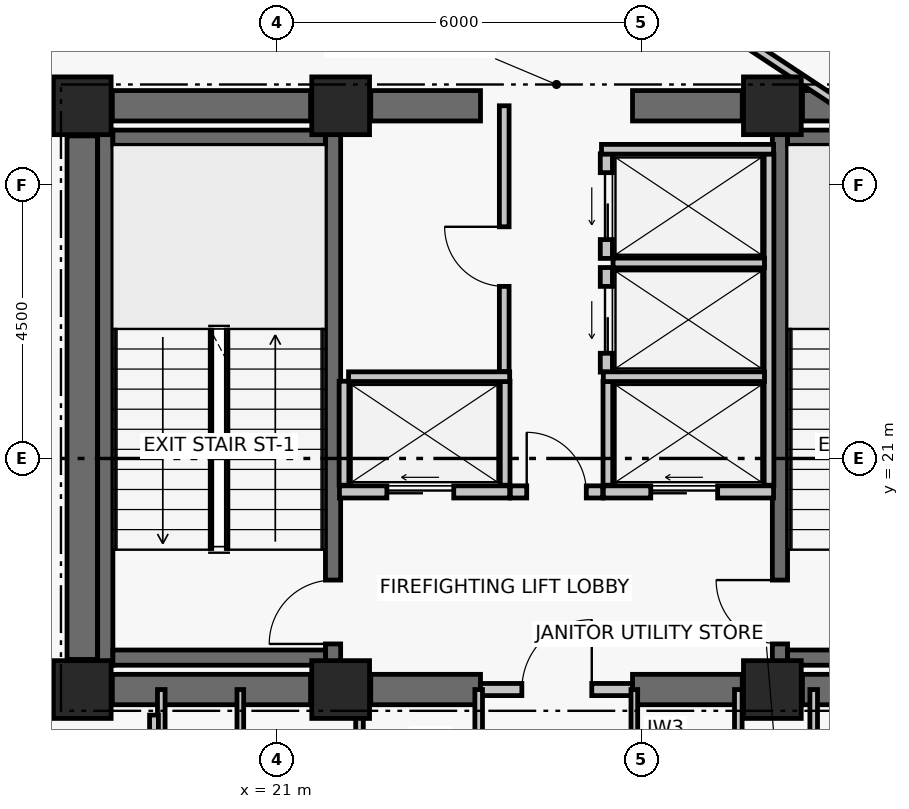
"""IFC4 building model, lengths in metres.
Left out: names, types, materials, properties, quantities, classifications, styles, units other than length and angle.
Written with IfcOpenShell. Run it as: python <this file> out.ifc"""

import sys

from ifc_helpers import new_model, si_unit, direction, frame, frame_2d, origin, origin_2d, place, context, subcontext, project, spatial, rectangle, extrude, element, fill, save


model = new_model("IFC4")
c1 = context("Model", 3, precision=1e-05, world=origin(), true_north=direction((0.0, 1.0)))
c2 = subcontext(c1, "Body", "Model", "MODEL_VIEW")
j1 = project(units=[si_unit("LENGTHUNIT", "METRE"), si_unit("PLANEANGLEUNIT", "RADIAN")], contexts=[c1])
p1 = place(None, origin())
s1 = spatial("IfcSite", under=j1, at=p1, CompositionType="ELEMENT")
p2 = place(p1, origin())
s2 = spatial("IfcBuilding", under=s1, at=p2, CompositionType="ELEMENT")
p3 = place(p2, frame((0.0, 0.0, 195.24)))
s3 = spatial("IfcBuildingStorey", under=s2, at=p3, CompositionType="ELEMENT", Elevation=195.24)
for number, where, z_axis, x_axis in (
    (1, (17.8, 17.2, 0.0), (0.0, 0.0, 1.0), (1.0, 0.0, 0.0)),
    (2, (22.05, 17.2, 0.0), (0.0, 0.0, 1.0), (1.0, 0.0, 0.0)),
    (3, (29.15, 17.2, 0.0), (0.0, 0.0, 1.0), (1.0, 0.0, 0.0)),
    (4, (17.8, 26.8, 0.0), (0.0, 0.0, 1.0), (1.0, 0.0, 0.0)),
    (5, (22.05, 26.8, 0.0), (0.0, 0.0, 1.0), (1.0, 0.0, 0.0)),
    (6, (29.15, 26.8, 0.0), (0.0, 0.0, 1.0), (1.0, 0.0, 0.0)),
):
    element("IfcColumn", number, at=place(p3, frame(where, z_axis=z_axis, x_axis=x_axis)), inside=s3, PredefinedType="COLUMN", context=c2, shape_type="SweptSolid", body=[
        extrude(rectangle(XDim=0.95, YDim=0.95, at=origin_2d()), origin(), (0.0, 0.0, 1.0), 3.72),
    ])
p4 = place(p3, frame((18.295, 17.2, 0.0), z_axis=(0.0, 0.0, 1.0), x_axis=(1.0, 0.0, 0.0)))
e7 = element("IfcWall", 7, at=p4, inside=s3, PredefinedType="SHEAR", context=c2, shape_type="SweptSolid", body=[
    extrude(rectangle(XDim=3.26, YDim=0.5, at=frame_2d((1.63, 0.0))), origin(), (0.0, 0.0, 1.0), 3.5),
])
p5 = place(p3, frame((22.545, 17.2, 0.0), z_axis=(0.0, 0.0, 1.0), x_axis=(1.0, 0.0, 0.0)))
e8 = element("IfcWall", 8, at=p5, inside=s3, PredefinedType="SHEAR", context=c2, shape_type="SweptSolid", body=[
    extrude(rectangle(XDim=1.805, YDim=0.5, at=frame_2d((0.903, 0.0))), origin(), (0.0, 0.0, 1.0), 3.5),
])
p6 = place(p3, frame((26.85, 17.2, 0.0), z_axis=(0.0, 0.0, 1.0), x_axis=(1.0, 0.0, 0.0)))
e9 = element("IfcWall", 9, at=p6, inside=s3, PredefinedType="SHEAR", context=c2, shape_type="SweptSolid", body=[
    extrude(rectangle(XDim=1.805, YDim=0.5, at=frame_2d((0.902, 0.0))), origin(), (0.0, 0.0, 1.0), 3.5),
])
for number, where, z_axis, x_axis in (
    (10, (29.645, 17.2, 0.0), (0.0, 0.0, 1.0), (1.0, 0.0, 0.0)),
    (11, (18.295, 26.8, 0.0), (0.0, 0.0, 1.0), (1.0, 0.0, 0.0)),
):
    element("IfcWall", number, at=place(p3, frame(where, z_axis=z_axis, x_axis=x_axis)), inside=s3, PredefinedType="SHEAR", context=c2, shape_type="SweptSolid", body=[
        extrude(rectangle(XDim=3.26, YDim=0.5, at=frame_2d((1.63, 0.0))), origin(), (0.0, 0.0, 1.0), 3.5),
    ])
p7 = place(p3, frame((22.545, 26.8, 0.0), z_axis=(0.0, 0.0, 1.0), x_axis=(1.0, 0.0, 0.0)))
e12 = element("IfcWall", 12, at=p7, inside=s3, PredefinedType="SHEAR", context=c2, shape_type="SweptSolid", body=[
    extrude(rectangle(XDim=1.805, YDim=0.5, at=frame_2d((0.903, 0.0))), origin(), (0.0, 0.0, 1.0), 3.5),
])
p8 = place(p3, frame((26.85, 26.8, 0.0), z_axis=(0.0, 0.0, 1.0), x_axis=(1.0, 0.0, 0.0)))
e13 = element("IfcWall", 13, at=p8, inside=s3, PredefinedType="SHEAR", context=c2, shape_type="SweptSolid", body=[
    extrude(rectangle(XDim=1.805, YDim=0.5, at=frame_2d((0.902, 0.0))), origin(), (0.0, 0.0, 1.0), 3.5),
])
p9 = place(p3, frame((29.645, 26.8, 0.0), z_axis=(0.0, 0.0, 1.0), x_axis=(1.0, 0.0, 0.0)))
e14 = element("IfcWall", 14, at=p9, inside=s3, PredefinedType="SHEAR", context=c2, shape_type="SweptSolid", body=[
    extrude(rectangle(XDim=3.26, YDim=0.5, at=frame_2d((1.63, 0.0))), origin(), (0.0, 0.0, 1.0), 3.5),
])
p10 = place(p3, frame((17.8, 17.695, 0.0), z_axis=(0.0, 0.0, 1.0), x_axis=(0.0, 1.0, 0.0)))
e15 = element("IfcWall", 15, at=p10, inside=s3, PredefinedType="SHEAR", context=c2, shape_type="SweptSolid", body=[
    extrude(rectangle(XDim=8.61, YDim=0.5, at=frame_2d((4.305, 0.0))), origin(), (0.0, 0.0, 1.0), 3.5),
])
p11 = place(p3, frame((18.179, 17.6, 0.0), z_axis=(0.0, 0.0, 1.0), x_axis=(0.0, 1.0, 0.0)))
e16 = element("IfcWall", 16, at=p11, inside=s3, PredefinedType="SHEAR", context=c2, shape_type="SweptSolid", body=[
    extrude(rectangle(XDim=8.8, YDim=0.25, at=frame_2d((4.4, 0.0))), origin(), (0.0, 0.0, 1.0), 3.5),
])
p12 = place(p3, frame((21.925, 17.6, 0.0), z_axis=(0.0, 0.0, 1.0), x_axis=(0.0, 1.0, 0.0)))
e17 = element("IfcWall", 17, at=p12, inside=s3, PredefinedType="SHEAR", context=c2, shape_type="SweptSolid", body=[
    extrude(rectangle(XDim=8.8, YDim=0.25, at=frame_2d((4.4, 0.0))), origin(), (0.0, 0.0, 1.0), 3.5),
])
p13 = place(p12, frame((0.35, 0.0, 0.0)))
e18 = element("IfcOpeningElement", 18, at=p13, cuts=e17, PredefinedType="OPENING", context=c2, shape_type="SweptSolid", body=[
    extrude(rectangle(XDim=1.05, YDim=2.08, at=frame_2d((0.525, 1.04))), frame((0.0, 0.135, 0.0), z_axis=(0.0, -1.0, 0.0), x_axis=(1.0, 0.0, 0.0)), (0.0, 0.0, 1.0), 0.27),
])
for number, where, z_axis, x_axis in (
    (19, (18.304, 17.725, 0.0), (0.0, 0.0, 1.0), (1.0, 0.0, 0.0)),
    (20, (18.304, 26.275, 0.0), (0.0, 0.0, 1.0), (1.0, 0.0, 0.0)),
):
    element("IfcWall", number, at=place(p3, frame(where, z_axis=z_axis, x_axis=x_axis)), inside=s3, PredefinedType="SHEAR", context=c2, shape_type="SweptSolid", body=[
        extrude(rectangle(XDim=3.496, YDim=0.25, at=frame_2d((1.748, 0.0))), origin(), (0.0, 0.0, 1.0), 3.5),
    ])
p14 = place(p3, frame((29.275, 17.6, 0.0), z_axis=(0.0, 0.0, 1.0), x_axis=(0.0, 1.0, 0.0)))
e21 = element("IfcWall", 21, at=p14, inside=s3, PredefinedType="SHEAR", context=c2, shape_type="SweptSolid", body=[
    extrude(rectangle(XDim=8.8, YDim=0.25, at=frame_2d((4.4, 0.0))), origin(), (0.0, 0.0, 1.0), 3.5),
])
p15 = place(p14, frame((0.35, 0.0, 0.0)))
e22 = element("IfcOpeningElement", 22, at=p15, cuts=e21, PredefinedType="OPENING", context=c2, shape_type="SweptSolid", body=[
    extrude(rectangle(XDim=1.05, YDim=2.08, at=frame_2d((0.525, 1.04))), frame((0.0, 0.135, 0.0), z_axis=(0.0, -1.0, 0.0), x_axis=(1.0, 0.0, 0.0)), (0.0, 0.0, 1.0), 0.27),
])
for number, where, z_axis, x_axis in (
    (23, (29.4, 17.725, 0.0), (0.0, 0.0, 1.0), (1.0, 0.0, 0.0)),
    (24, (29.4, 26.275, 0.0), (0.0, 0.0, 1.0), (1.0, 0.0, 0.0)),
):
    element("IfcWall", number, at=place(p3, frame(where, z_axis=z_axis, x_axis=x_axis)), inside=s3, PredefinedType="SHEAR", context=c2, shape_type="SweptSolid", body=[
        extrude(rectangle(XDim=3.496, YDim=0.25, at=frame_2d((1.748, 0.0))), origin(), (0.0, 0.0, 1.0), 3.5),
    ])
p16 = place(p3, frame((29.351, 29.666, 0.0), z_axis=(0.0, 0.0, 1.0), x_axis=(0.834275733291, -0.551347441131, 0.0)))
e25 = element("IfcWall", 25, at=p16, inside=s3, PredefinedType="PARTITIONING", context=c2, shape_type="SweptSolid", body=[
    extrude(rectangle(XDim=4.341, YDim=0.26, at=frame_2d((2.171, 0.0))), origin(), (0.0, 0.0, 1.0), 2.63),
])
p17 = place(p3, frame((24.35, 17.2, 0.0), z_axis=(0.0, 0.0, 1.0), x_axis=(1.0, 0.0, 0.0)))
e26 = element("IfcWall", 26, at=p17, inside=s3, PredefinedType="PARTITIONING", context=c2, shape_type="SweptSolid", body=[
    extrude(rectangle(XDim=2.5, YDim=0.2, at=frame_2d((1.25, 0.0))), origin(), (0.0, 0.0, 1.0), 2.63),
])
p18 = place(p17, frame((0.68, 0.0, 0.0)))
e27 = element("IfcOpeningElement", 27, at=p18, cuts=e26, PredefinedType="OPENING", context=c2, shape_type="SweptSolid", body=[
    extrude(rectangle(XDim=1.15, YDim=2.08, at=frame_2d((0.575, 1.04))), frame((0.0, 0.11, 0.0), z_axis=(0.0, -1.0, 0.0), x_axis=(1.0, 0.0, 0.0)), (0.0, 0.0, 1.0), 0.22),
])
p19 = place(p3, frame((24.84, 20.45, 0.0), z_axis=(0.0, 0.0, 1.0), x_axis=(1.0, 0.0, 0.0)))
e28 = element("IfcWall", 28, at=p19, inside=s3, PredefinedType="PARTITIONING", context=c2, shape_type="SweptSolid", body=[
    extrude(rectangle(XDim=1.52, YDim=0.2, at=frame_2d((0.76, 0.0))), origin(), (0.0, 0.0, 1.0), 3.5),
])
p20 = place(p19, frame((0.27, 0.0, 0.0)))
e29 = element("IfcOpeningElement", 29, at=p20, cuts=e28, PredefinedType="OPENING", context=c2, shape_type="SweptSolid", body=[
    extrude(rectangle(XDim=0.98, YDim=2.06, at=frame_2d((0.49, 1.03))), frame((0.0, 0.11, 0.0), z_axis=(0.0, -1.0, 0.0), x_axis=(1.0, 0.0, 0.0)), (0.0, 0.0, 1.0), 0.22),
])
p21 = place(p3, frame((22.03, 20.45, 0.0), z_axis=(0.0, 0.0, 1.0), x_axis=(1.0, 0.0, 0.0)))
e30 = element("IfcWall", 30, at=p21, inside=s3, PredefinedType="PARTITIONING", context=c2, shape_type="SweptSolid", body=[
    extrude(rectangle(XDim=2.8, YDim=0.2, at=frame_2d((1.4, 0.0))), origin(), (0.0, 0.0, 1.0), 3.5),
])
p22 = place(p21, frame((0.78, 0.0, 0.0)))
e31 = element("IfcOpeningElement", 31, at=p22, cuts=e30, PredefinedType="OPENING", context=c2, shape_type="SweptSolid", body=[
    extrude(rectangle(XDim=1.1, YDim=2.08, at=frame_2d((0.55, 1.04))), frame((0.0, 0.11, 0.0), z_axis=(0.0, -1.0, 0.0), x_axis=(1.0, 0.0, 0.0)), (0.0, 0.0, 1.0), 0.22),
])
p23 = place(p3, frame((26.37, 20.45, 0.0), z_axis=(0.0, 0.0, 1.0), x_axis=(1.0, 0.0, 0.0)))
e32 = element("IfcWall", 32, at=p23, inside=s3, PredefinedType="PARTITIONING", context=c2, shape_type="SweptSolid", body=[
    extrude(rectangle(XDim=2.8, YDim=0.2, at=frame_2d((1.4, 0.0))), origin(), (0.0, 0.0, 1.0), 3.5),
])
p24 = place(p23, frame((0.78, 0.0, 0.0)))
e33 = element("IfcOpeningElement", 33, at=p24, cuts=e32, PredefinedType="OPENING", context=c2, shape_type="SweptSolid", body=[
    extrude(rectangle(XDim=1.1, YDim=2.08, at=frame_2d((0.55, 1.04))), frame((0.0, 0.11, 0.0), z_axis=(0.0, -1.0, 0.0), x_axis=(1.0, 0.0, 0.0)), (0.0, 0.0, 1.0), 0.22),
])
p25 = place(p3, frame((26.42, 22.42, 0.0), z_axis=(0.0, 0.0, 1.0), x_axis=(0.0, 1.0, 0.0)))
e34 = element("IfcWall", 34, at=p25, inside=s3, PredefinedType="PARTITIONING", context=c2, shape_type="SweptSolid", body=[
    extrude(rectangle(XDim=1.72, YDim=0.2, at=frame_2d((0.86, 0.0))), origin(), (0.0, 0.0, 1.0), 3.5),
])
p26 = place(p25, frame((0.31, 0.0, 0.0)))
e35 = element("IfcOpeningElement", 35, at=p26, cuts=e34, PredefinedType="OPENING", context=c2, shape_type="SweptSolid", body=[
    extrude(rectangle(XDim=1.1, YDim=2.08, at=frame_2d((0.55, 1.04))), frame((0.0, 0.11, 0.0), z_axis=(0.0, -1.0, 0.0), x_axis=(1.0, 0.0, 0.0)), (0.0, 0.0, 1.0), 0.22),
])
p27 = place(p3, frame((26.42, 24.29, 0.0), z_axis=(0.0, 0.0, 1.0), x_axis=(0.0, 1.0, 0.0)))
e36 = element("IfcWall", 36, at=p27, inside=s3, PredefinedType="PARTITIONING", context=c2, shape_type="SweptSolid", body=[
    extrude(rectangle(XDim=1.72, YDim=0.2, at=frame_2d((0.86, 0.0))), origin(), (0.0, 0.0, 1.0), 3.5),
])
p28 = place(p27, frame((0.31, 0.0, 0.0)))
e37 = element("IfcOpeningElement", 37, at=p28, cuts=e36, PredefinedType="OPENING", context=c2, shape_type="SweptSolid", body=[
    extrude(rectangle(XDim=1.1, YDim=2.08, at=frame_2d((0.55, 1.04))), frame((0.0, 0.11, 0.0), z_axis=(0.0, -1.0, 0.0), x_axis=(1.0, 0.0, 0.0)), (0.0, 0.0, 1.0), 0.22),
])
for number, where, z_axis, x_axis in (
    (38, (22.105, 20.56, 0.0), (0.0, 0.0, 1.0), (0.0, 1.0, 0.0)),
    (39, (24.755, 20.56, 0.0), (0.0, 0.0, 1.0), (0.0, 1.0, 0.0)),
):
    element("IfcWall", number, at=place(p3, frame(where, z_axis=z_axis, x_axis=x_axis)), inside=s3, PredefinedType="PARTITIONING", context=c2, shape_type="SweptSolid", body=[
        extrude(rectangle(XDim=1.71, YDim=0.16, at=frame_2d((0.855, 0.0))), origin(), (0.0, 0.0, 1.0), 3.5),
    ])
p29 = place(p3, frame((22.18, 22.345, 0.0), z_axis=(0.0, 0.0, 1.0), x_axis=(1.0, 0.0, 0.0)))
e40 = element("IfcWall", 40, at=p29, inside=s3, PredefinedType="PARTITIONING", context=c2, shape_type="SweptSolid", body=[
    extrude(rectangle(XDim=2.65, YDim=0.16, at=frame_2d((1.325, 0.0))), origin(), (0.0, 0.0, 1.0), 3.5),
])
p30 = place(p3, frame((29.095, 20.56, 0.0), z_axis=(0.0, 0.0, 1.0), x_axis=(0.0, 1.0, 0.0)))
e41 = element("IfcWall", 41, at=p30, inside=s3, PredefinedType="PARTITIONING", context=c2, shape_type="SweptSolid", body=[
    extrude(rectangle(XDim=5.45, YDim=0.16, at=frame_2d((2.725, 0.0))), origin(), (0.0, 0.0, 1.0), 3.5),
])
p31 = place(p3, frame((26.445, 20.56, 0.0), z_axis=(0.0, 0.0, 1.0), x_axis=(0.0, 1.0, 0.0)))
e42 = element("IfcWall", 42, at=p31, inside=s3, PredefinedType="PARTITIONING", context=c2, shape_type="SweptSolid", body=[
    extrude(rectangle(XDim=1.71, YDim=0.16, at=frame_2d((0.855, 0.0))), origin(), (0.0, 0.0, 1.0), 3.5),
])
p32 = place(p3, frame((26.37, 22.345, 0.0), z_axis=(0.0, 0.0, 1.0), x_axis=(1.0, 0.0, 0.0)))
e43 = element("IfcWall", 43, at=p32, inside=s3, PredefinedType="PARTITIONING", context=c2, shape_type="SweptSolid", body=[
    extrude(rectangle(XDim=2.65, YDim=0.16, at=frame_2d((1.325, 0.0))), origin(), (0.0, 0.0, 1.0), 3.5),
])
p33 = place(p3, frame((26.53, 24.215, 0.0), z_axis=(0.0, 0.0, 1.0), x_axis=(1.0, 0.0, 0.0)))
e44 = element("IfcWall", 44, at=p33, inside=s3, PredefinedType="PARTITIONING", context=c2, shape_type="SweptSolid", body=[
    extrude(rectangle(XDim=2.49, YDim=0.16, at=frame_2d((1.245, 0.0))), origin(), (0.0, 0.0, 1.0), 3.5),
])
p34 = place(p3, frame((26.34, 26.085, 0.0), z_axis=(0.0, 0.0, 1.0), x_axis=(1.0, 0.0, 0.0)))
e45 = element("IfcWall", 45, at=p34, inside=s3, PredefinedType="PARTITIONING", context=c2, shape_type="SweptSolid", body=[
    extrude(rectangle(XDim=2.83, YDim=0.16, at=frame_2d((1.415, 0.0))), origin(), (0.0, 0.0, 1.0), 3.5),
])
p35 = place(p3, frame((24.74, 22.43, 0.0), z_axis=(0.0, 0.0, 1.0), x_axis=(0.0, 1.0, 0.0)))
e46 = element("IfcWall", 46, at=p35, inside=s3, PredefinedType="PARTITIONING", context=c2, shape_type="SweptSolid", body=[
    extrude(rectangle(XDim=4.37, YDim=0.16, at=frame_2d((2.185, 0.0))), origin(), (0.0, 0.0, 1.0), 2.63),
])
p36 = place(p35, frame((1.4, 0.0, 0.0)))
e47 = element("IfcOpeningElement", 47, at=p36, cuts=e46, PredefinedType="OPENING", context=c2, shape_type="SweptSolid", body=[
    extrude(rectangle(XDim=0.98, YDim=2.06, at=frame_2d((0.49, 1.03))), frame((0.0, 0.09, 0.0), z_axis=(0.0, -1.0, 0.0), x_axis=(1.0, 0.0, 0.0)), (0.0, 0.0, 1.0), 0.18),
])
p37 = place(p3, frame((19.1, 14.95, 0.0), z_axis=(0.0, 0.0, 1.0), x_axis=(0.0, 1.0, 0.0)))
e48 = element("IfcWall", 48, at=p37, inside=s3, PredefinedType="PARTITIONING", context=c2, shape_type="SweptSolid", body=[
    extrude(rectangle(XDim=2.25, YDim=0.125, at=frame_2d((1.125, 0.0))), origin(), (0.0, 0.0, 1.0), 2.63),
])
p38 = place(p3, frame((20.4, 14.95, 0.0), z_axis=(0.0, 0.0, 1.0), x_axis=(0.0, 1.0, 0.0)))
e49 = element("IfcWall", 49, at=p38, inside=s3, PredefinedType="PARTITIONING", context=c2, shape_type="SweptSolid", body=[
    extrude(rectangle(XDim=2.25, YDim=0.11, at=frame_2d((1.125, 0.0))), origin(), (0.0, 0.0, 1.0), 2.63),
])
for number, where, z_axis, x_axis in (
    (50, (22.36, 14.95, 0.0), (0.0, 0.0, 1.0), (0.0, 1.0, 0.0)),
    (51, (24.32, 14.95, 0.0), (0.0, 0.0, 1.0), (0.0, 1.0, 0.0)),
):
    element("IfcWall", number, at=place(p3, frame(where, z_axis=z_axis, x_axis=x_axis)), inside=s3, PredefinedType="PARTITIONING", context=c2, shape_type="SweptSolid", body=[
        extrude(rectangle(XDim=2.25, YDim=0.125, at=frame_2d((1.125, 0.0))), origin(), (0.0, 0.0, 1.0), 2.63),
    ])
p39 = place(p3, frame((26.88, 14.95, 0.0), z_axis=(0.0, 0.0, 1.0), x_axis=(0.0, 1.0, 0.0)))
e52 = element("IfcWall", 52, at=p39, inside=s3, PredefinedType="PARTITIONING", context=c2, shape_type="SweptSolid", body=[
    extrude(rectangle(XDim=2.25, YDim=0.11, at=frame_2d((1.125, 0.0))), origin(), (0.0, 0.0, 1.0), 2.63),
])
for number, where, z_axis, x_axis in (
    (53, (28.59, 14.95, 0.0), (0.0, 0.0, 1.0), (0.0, 1.0, 0.0)),
    (54, (29.83, 14.95, 0.0), (0.0, 0.0, 1.0), (0.0, 1.0, 0.0)),
):
    element("IfcWall", number, at=place(p3, frame(where, z_axis=z_axis, x_axis=x_axis)), inside=s3, PredefinedType="PARTITIONING", context=c2, shape_type="SweptSolid", body=[
        extrude(rectangle(XDim=2.25, YDim=0.125, at=frame_2d((1.125, 0.0))), origin(), (0.0, 0.0, 1.0), 2.63),
    ])
p40 = place(p3, frame((16.024, 27.06, 0.0), z_axis=(0.0, 0.0, 1.0), x_axis=(1.0, 0.0, 0.0)))
e55 = element("IfcWall", 55, at=p40, inside=s3, PredefinedType="PARTITIONING", context=c2, shape_type="SweptSolid", body=[
    extrude(rectangle(XDim=1.356, YDim=0.145, at=frame_2d((0.678, 0.0))), origin(), (0.0, 0.0, 1.0), 2.73),
])
p41 = place(p3, frame((18.98, 16.78, 0.0), z_axis=(0.0, 0.0, 1.0), x_axis=(0.0, -1.0, 0.0)))
e56 = element("IfcWall", 56, at=p41, inside=s3, PredefinedType="PARTITIONING", context=c2, shape_type="SweptSolid", body=[
    extrude(rectangle(XDim=1.85, YDim=0.145, at=frame_2d((0.925, 0.0))), origin(), (0.0, 0.0, 1.0), 2.63),
])
p42 = place(p3, frame((30.295, 26.8, 0.0), z_axis=(0.0, 0.0, 1.0), x_axis=(-0.834281274053, 0.551339056992, 0.0)))
e57 = element("IfcWall", 57, at=p42, inside=s3, PredefinedType="PARTITIONING", context=c2, shape_type="SweptSolid", body=[
    extrude(rectangle(XDim=2.115, YDim=0.145, at=frame_2d((1.058, 0.0))), origin(), (0.0, 0.0, 1.0), 2.63),
])
p43 = place(p13, origin())
e58 = element("IfcDoor", 58, at=p43, inside=s3, OperationType="SINGLE_SWING_LEFT", PredefinedType="DOOR", context=c2, shape_type="SweptSolid", body=[
    extrude(rectangle(XDim=1.05, YDim=2.08, at=frame_2d((0.525, 1.04))), frame((0.0, 0.025, 0.0), z_axis=(0.0, -1.0, 0.0), x_axis=(1.0, 0.0, 0.0)), (0.0, 0.0, 1.0), 0.05),
])
fill(e18, e58)
p44 = place(p15, origin())
e59 = element("IfcDoor", 59, at=p44, inside=s3, OperationType="SINGLE_SWING_RIGHT", PredefinedType="DOOR", context=c2, shape_type="SweptSolid", body=[
    extrude(rectangle(XDim=1.05, YDim=2.08, at=frame_2d((0.525, 1.04))), frame((0.0, 0.025, 0.0), z_axis=(0.0, -1.0, 0.0), x_axis=(1.0, 0.0, 0.0)), (0.0, 0.0, 1.0), 0.05),
])
fill(e22, e59)
p45 = place(p18, origin())
e60 = element("IfcDoor", 60, at=p45, inside=s3, OperationType="SINGLE_SWING_RIGHT", PredefinedType="DOOR", context=c2, shape_type="SweptSolid", body=[
    extrude(rectangle(XDim=1.15, YDim=2.08, at=frame_2d((0.575, 1.04))), frame((0.0, 0.025, 0.0), z_axis=(0.0, -1.0, 0.0), x_axis=(1.0, 0.0, 0.0)), (0.0, 0.0, 1.0), 0.05),
])
fill(e27, e60)
p46 = place(p20, origin())
e61 = element("IfcDoor", 61, at=p46, inside=s3, OperationType="SINGLE_SWING_LEFT", PredefinedType="DOOR", context=c2, shape_type="SweptSolid", body=[
    extrude(rectangle(XDim=0.98, YDim=2.06, at=frame_2d((0.49, 1.03))), frame((0.0, 0.025, 0.0), z_axis=(0.0, -1.0, 0.0), x_axis=(1.0, 0.0, 0.0)), (0.0, 0.0, 1.0), 0.05),
])
fill(e29, e61)
p47 = place(p22, origin())
e62 = element("IfcDoor", 62, at=p47, inside=s3, OperationType="DOUBLE_DOOR_SLIDING", PredefinedType="DOOR", context=c2, shape_type="SweptSolid", body=[
    extrude(rectangle(XDim=1.1, YDim=2.08, at=frame_2d((0.55, 1.04))), frame((0.0, 0.025, 0.0), z_axis=(0.0, -1.0, 0.0), x_axis=(1.0, 0.0, 0.0)), (0.0, 0.0, 1.0), 0.05),
])
fill(e31, e62)
p48 = place(p24, origin())
e63 = element("IfcDoor", 63, at=p48, inside=s3, OperationType="DOUBLE_DOOR_SLIDING", PredefinedType="DOOR", context=c2, shape_type="SweptSolid", body=[
    extrude(rectangle(XDim=1.1, YDim=2.08, at=frame_2d((0.55, 1.04))), frame((0.0, 0.025, 0.0), z_axis=(0.0, -1.0, 0.0), x_axis=(1.0, 0.0, 0.0)), (0.0, 0.0, 1.0), 0.05),
])
fill(e33, e63)
p49 = place(p26, origin())
e64 = element("IfcDoor", 64, at=p49, inside=s3, OperationType="DOUBLE_DOOR_SLIDING", PredefinedType="DOOR", context=c2, shape_type="SweptSolid", body=[
    extrude(rectangle(XDim=1.1, YDim=2.08, at=frame_2d((0.55, 1.04))), frame((0.0, 0.025, 0.0), z_axis=(0.0, -1.0, 0.0), x_axis=(1.0, 0.0, 0.0)), (0.0, 0.0, 1.0), 0.05),
])
fill(e35, e64)
p50 = place(p28, origin())
e65 = element("IfcDoor", 65, at=p50, inside=s3, OperationType="DOUBLE_DOOR_SLIDING", PredefinedType="DOOR", context=c2, shape_type="SweptSolid", body=[
    extrude(rectangle(XDim=1.1, YDim=2.08, at=frame_2d((0.55, 1.04))), frame((0.0, 0.025, 0.0), z_axis=(0.0, -1.0, 0.0), x_axis=(1.0, 0.0, 0.0)), (0.0, 0.0, 1.0), 0.05),
])
fill(e37, e65)
p51 = place(p36, origin())
e66 = element("IfcDoor", 66, at=p51, inside=s3, OperationType="SINGLE_SWING_RIGHT", PredefinedType="DOOR", context=c2, shape_type="SweptSolid", body=[
    extrude(rectangle(XDim=0.98, YDim=2.06, at=frame_2d((0.49, 1.03))), frame((0.0, 0.025, 0.0), z_axis=(0.0, -1.0, 0.0), x_axis=(1.0, 0.0, 0.0)), (0.0, 0.0, 1.0), 0.05),
])
fill(e47, e66)
save(model, sys.argv[1])
